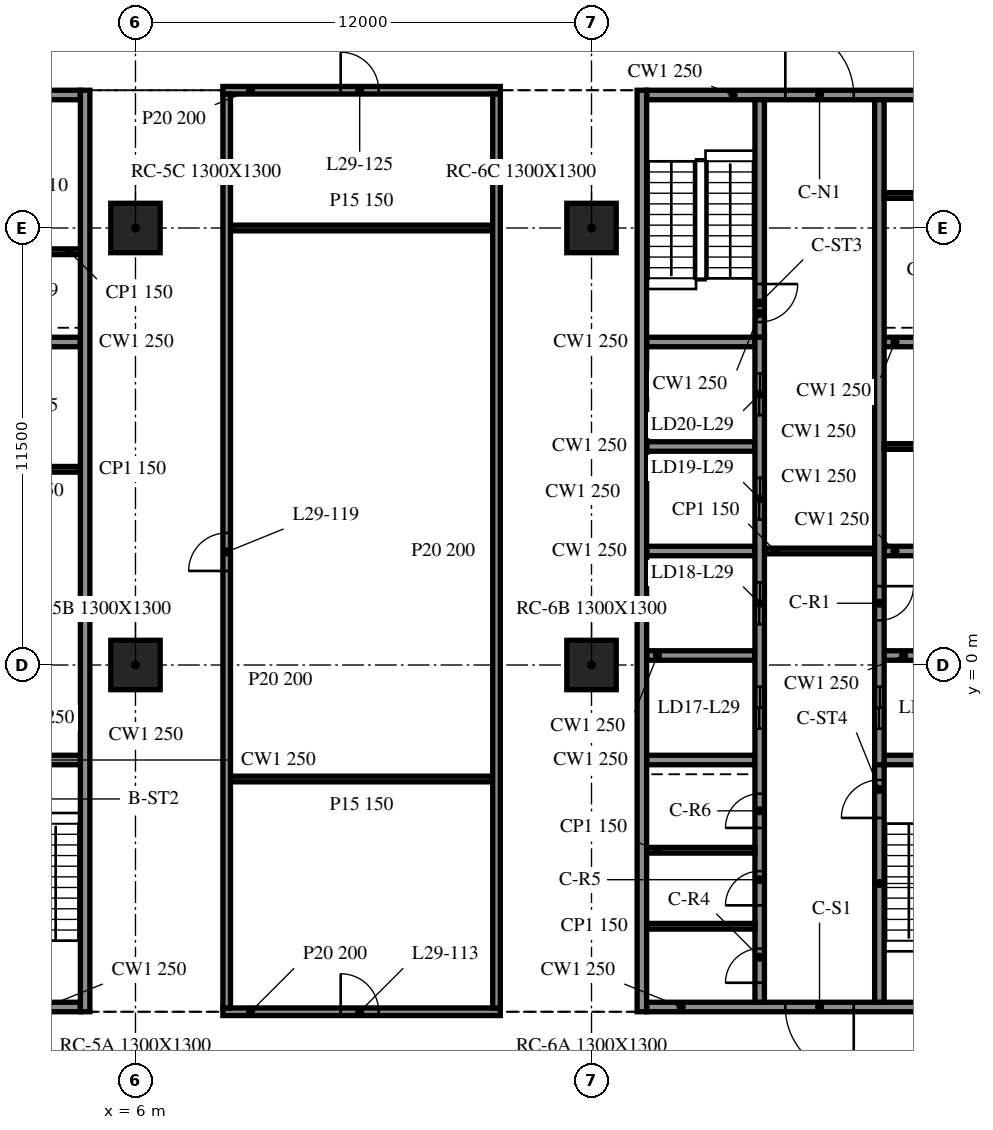
"""IFC4 building model, lengths in metres.
Left out: names, types, materials, properties, quantities, classifications, styles, units other than length and angle.
Written with IfcOpenShell. Run it as: python <this file> out.ifc"""

import sys

from ifc_helpers import new_model, si_unit, direction, frame, frame_2d, origin, origin_2d, place, context, subcontext, project, spatial, rectangle, extrude, element, fill, save


model = new_model("IFC4")
c1 = context("Model", 3, precision=1e-05, world=origin(), true_north=direction((0.0, 1.0)))
c2 = subcontext(c1, "Body", "Model", "MODEL_VIEW")
j1 = project(units=[si_unit("LENGTHUNIT", "METRE"), si_unit("PLANEANGLEUNIT", "RADIAN")], contexts=[c1])
p1 = place(None, origin())
s1 = spatial("IfcSite", under=j1, at=p1, CompositionType="ELEMENT")
p2 = place(p1, origin())
s2 = spatial("IfcBuilding", under=s1, at=p2, CompositionType="ELEMENT")
p3 = place(p2, frame((0.0, 0.0, 126.1)))
s3 = spatial("IfcBuildingStorey", under=s2, at=p3, CompositionType="ELEMENT", Elevation=126.1)
for number, where, z_axis, x_axis in (
    (1, (6.0, 0.0, -0.34), (0.0, 0.0, 1.0), (1.0, 0.0, 0.0)),
    (2, (6.0, 11.5, -0.34), (0.0, 0.0, 1.0), (1.0, 0.0, 0.0)),
    (3, (18.0, 0.0, -0.34), (0.0, 0.0, 1.0), (1.0, 0.0, 0.0)),
    (4, (18.0, 11.5, -0.34), (0.0, 0.0, 1.0), (1.0, 0.0, 0.0)),
):
    element("IfcColumn", number, at=place(p3, frame(where, z_axis=z_axis, x_axis=x_axis)), inside=s3, PredefinedType="COLUMN", context=c2, shape_type="SweptSolid", body=[
        extrude(rectangle(XDim=1.3, YDim=1.3, at=origin_2d()), origin(), (0.0, 0.0, 1.0), 4.1),
    ])
p4 = place(p3, frame((4.675, -9.125, 0.0), z_axis=(0.0, 0.0, 1.0), x_axis=(0.0, 1.0, 0.0)))
e5 = element("IfcWall", 5, at=p4, inside=s3, PredefinedType="SOLIDWALL", context=c2, shape_type="SweptSolid", body=[
    extrude(rectangle(XDim=24.25, YDim=0.25, at=frame_2d((12.125, 0.0))), origin(), (0.0, 0.0, 1.0), 3.76),
])
p5 = place(p3, frame((4.55, -9.0, 0.0), z_axis=(0.0, 0.0, 1.0), x_axis=(-1.0, 0.0, 0.0)))
e6 = element("IfcWall", 6, at=p5, inside=s3, PredefinedType="SOLIDWALL", context=c2, shape_type="SweptSolid", body=[
    extrude(rectangle(XDim=9.1, YDim=0.25, at=frame_2d((4.55, 0.0))), origin(), (0.0, 0.0, 1.0), 3.76),
])
p6 = place(p5, frame((3.65, 0.0, 0.0)))
e7 = element("IfcOpeningElement", 7, at=p6, cuts=e6, PredefinedType="OPENING", context=c2, shape_type="SweptSolid", body=[
    extrude(rectangle(XDim=1.8, YDim=2.1, at=frame_2d((0.9, 1.05))), frame((0.0, 0.135, 0.0), z_axis=(0.0, -1.0, 0.0), x_axis=(1.0, 0.0, 0.0)), (0.0, 0.0, 1.0), 0.27),
])
p7 = place(p3, frame((-4.55, 15.0, 0.0), z_axis=(0.0, 0.0, 1.0), x_axis=(1.0, 0.0, 0.0)))
e8 = element("IfcWall", 8, at=p7, inside=s3, PredefinedType="SOLIDWALL", context=c2, shape_type="SweptSolid", body=[
    extrude(rectangle(XDim=9.1, YDim=0.25, at=frame_2d((4.55, 0.0))), origin(), (0.0, 0.0, 1.0), 3.76),
])
p8 = place(p7, frame((3.65, 0.0, 0.0)))
e9 = element("IfcOpeningElement", 9, at=p8, cuts=e8, PredefinedType="OPENING", context=c2, shape_type="SweptSolid", body=[
    extrude(rectangle(XDim=1.8, YDim=2.1, at=frame_2d((0.9, 1.05))), frame((0.0, 0.135, 0.0), z_axis=(0.0, -1.0, 0.0), x_axis=(1.0, 0.0, 0.0)), (0.0, 0.0, 1.0), 0.27),
])
for number, where, z_axis, x_axis in (
    (10, (1.7, -2.5, 0.0), (0.0, 0.0, 1.0), (1.0, 0.0, 0.0)),
    (11, (1.7, 8.5, 0.0), (0.0, 0.0, 1.0), (1.0, 0.0, 0.0)),
):
    element("IfcWall", number, at=place(p3, frame(where, z_axis=z_axis, x_axis=x_axis)), inside=s3, PredefinedType="SOLIDWALL", context=c2, shape_type="SweptSolid", body=[
        extrude(rectangle(XDim=2.85, YDim=0.25, at=frame_2d((1.425, 0.0))), origin(), (0.0, 0.0, 1.0), 3.76),
    ])
for number, where, z_axis, x_axis in (
    (12, (1.7, 5.15, 0.0), (0.0, 0.0, 1.0), (1.0, 0.0, 0.0)),
    (13, (1.7, 10.875, 0.0), (0.0, 0.0, 1.0), (1.0, 0.0, 0.0)),
):
    element("IfcWall", number, at=place(p3, frame(where, z_axis=z_axis, x_axis=x_axis)), inside=s3, PredefinedType="PARTITIONING", context=c2, shape_type="SweptSolid", body=[
        extrude(rectangle(XDim=2.85, YDim=0.15, at=frame_2d((1.425, 0.0))), origin(), (0.0, 0.0, 1.0), 3.76),
    ])
p9 = place(p3, frame((19.325, 15.125, 0.0), z_axis=(0.0, 0.0, 1.0), x_axis=(0.0, -1.0, 0.0)))
e14 = element("IfcWall", 14, at=p9, inside=s3, PredefinedType="SOLIDWALL", context=c2, shape_type="SweptSolid", body=[
    extrude(rectangle(XDim=24.25, YDim=0.25, at=frame_2d((12.125, 0.0))), origin(), (0.0, 0.0, 1.0), 3.76),
])
p10 = place(p3, frame((28.55, -9.0, 0.0), z_axis=(0.0, 0.0, 1.0), x_axis=(-1.0, 0.0, 0.0)))
e15 = element("IfcWall", 15, at=p10, inside=s3, PredefinedType="SOLIDWALL", context=c2, shape_type="SweptSolid", body=[
    extrude(rectangle(XDim=9.1, YDim=0.25, at=frame_2d((4.55, 0.0))), origin(), (0.0, 0.0, 1.0), 3.76),
])
p11 = place(p10, frame((3.65, 0.0, 0.0)))
e16 = element("IfcOpeningElement", 16, at=p11, cuts=e15, PredefinedType="OPENING", context=c2, shape_type="SweptSolid", body=[
    extrude(rectangle(XDim=1.8, YDim=2.1, at=frame_2d((0.9, 1.05))), frame((0.0, 0.135, 0.0), z_axis=(0.0, -1.0, 0.0), x_axis=(1.0, 0.0, 0.0)), (0.0, 0.0, 1.0), 0.27),
])
p12 = place(p3, frame((19.45, 15.0, 0.0), z_axis=(0.0, 0.0, 1.0), x_axis=(1.0, 0.0, 0.0)))
e17 = element("IfcWall", 17, at=p12, inside=s3, PredefinedType="SOLIDWALL", context=c2, shape_type="SweptSolid", body=[
    extrude(rectangle(XDim=9.1, YDim=0.25, at=frame_2d((4.55, 0.0))), origin(), (0.0, 0.0, 1.0), 3.76),
])
p13 = place(p12, frame((3.65, 0.0, 0.0)))
e18 = element("IfcOpeningElement", 18, at=p13, cuts=e17, PredefinedType="OPENING", context=c2, shape_type="SweptSolid", body=[
    extrude(rectangle(XDim=1.8, YDim=2.1, at=frame_2d((0.9, 1.05))), frame((0.0, 0.135, 0.0), z_axis=(0.0, -1.0, 0.0), x_axis=(1.0, 0.0, 0.0)), (0.0, 0.0, 1.0), 0.27),
])
p14 = place(p3, frame((22.425, -8.875, 0.0), z_axis=(0.0, 0.0, 1.0), x_axis=(0.0, 1.0, 0.0)))
e19 = element("IfcWall", 19, at=p14, inside=s3, PredefinedType="SOLIDWALL", context=c2, shape_type="SweptSolid", body=[
    extrude(rectangle(XDim=17.5, YDim=0.25, at=frame_2d((8.75, 0.0))), origin(), (0.0, 0.0, 1.0), 3.76),
])
p15 = place(p14, frame((7.2, 0.0, 0.0)))
e20 = element("IfcOpeningElement", 20, at=p15, cuts=e19, PredefinedType="OPENING", context=c2, shape_type="SweptSolid", body=[
    extrude(rectangle(XDim=1.1, YDim=2.1, at=frame_2d((0.55, 1.05))), frame((0.0, 0.135, 0.0), z_axis=(0.0, -1.0, 0.0), x_axis=(1.0, 0.0, 0.0)), (0.0, 0.0, 1.0), 0.27),
])
p16 = place(p14, frame((9.95, 0.0, 0.0)))
e21 = element("IfcOpeningElement", 21, at=p16, cuts=e19, PredefinedType="OPENING", context=c2, shape_type="SweptSolid", body=[
    extrude(rectangle(XDim=1.1, YDim=2.1, at=frame_2d((0.55, 1.05))), frame((0.0, 0.135, 0.0), z_axis=(0.0, -1.0, 0.0), x_axis=(1.0, 0.0, 0.0)), (0.0, 0.0, 1.0), 0.27),
])
p17 = place(p14, frame((12.7, 0.0, 0.0)))
e22 = element("IfcOpeningElement", 22, at=p17, cuts=e19, PredefinedType="OPENING", context=c2, shape_type="SweptSolid", body=[
    extrude(rectangle(XDim=1.1, YDim=2.1, at=frame_2d((0.55, 1.05))), frame((0.0, 0.135, 0.0), z_axis=(0.0, -1.0, 0.0), x_axis=(1.0, 0.0, 0.0)), (0.0, 0.0, 1.0), 0.27),
])
p18 = place(p14, frame((15.45, 0.0, 0.0)))
e23 = element("IfcOpeningElement", 23, at=p18, cuts=e19, PredefinedType="OPENING", context=c2, shape_type="SweptSolid", body=[
    extrude(rectangle(XDim=1.1, YDim=2.1, at=frame_2d((0.55, 1.05))), frame((0.0, 0.135, 0.0), z_axis=(0.0, -1.0, 0.0), x_axis=(1.0, 0.0, 0.0)), (0.0, 0.0, 1.0), 0.27),
])
p19 = place(p14, frame((0.512, 0.0, 0.0)))
e24 = element("IfcOpeningElement", 24, at=p19, cuts=e19, PredefinedType="OPENING", context=c2, shape_type="SweptSolid", body=[
    extrude(rectangle(XDim=0.9, YDim=2.1, at=frame_2d((0.45, 1.05))), frame((0.0, 0.135, 0.0), z_axis=(0.0, -1.0, 0.0), x_axis=(1.0, 0.0, 0.0)), (0.0, 0.0, 1.0), 0.27),
])
p20 = place(p14, frame((2.55, 0.0, 0.0)))
e25 = element("IfcOpeningElement", 25, at=p20, cuts=e19, PredefinedType="OPENING", context=c2, shape_type="SweptSolid", body=[
    extrude(rectangle(XDim=0.9, YDim=2.1, at=frame_2d((0.45, 1.05))), frame((0.0, 0.135, 0.0), z_axis=(0.0, -1.0, 0.0), x_axis=(1.0, 0.0, 0.0)), (0.0, 0.0, 1.0), 0.27),
])
p21 = place(p14, frame((4.587, 0.0, 0.0)))
e26 = element("IfcOpeningElement", 26, at=p21, cuts=e19, PredefinedType="OPENING", context=c2, shape_type="SweptSolid", body=[
    extrude(rectangle(XDim=0.9, YDim=2.1, at=frame_2d((0.45, 1.05))), frame((0.0, 0.135, 0.0), z_axis=(0.0, -1.0, 0.0), x_axis=(1.0, 0.0, 0.0)), (0.0, 0.0, 1.0), 0.27),
])
p22 = place(p3, frame((22.425, 14.875, 0.0), z_axis=(0.0, 0.0, 1.0), x_axis=(0.0, -1.0, 0.0)))
e27 = element("IfcWall", 27, at=p22, inside=s3, PredefinedType="SOLIDWALL", context=c2, shape_type="SweptSolid", body=[
    extrude(rectangle(XDim=6.25, YDim=0.25, at=frame_2d((3.125, 0.0))), origin(), (0.0, 0.0, 1.0), 3.76),
])
p23 = place(p22, frame((4.85, 0.0, 0.0)))
e28 = element("IfcOpeningElement", 28, at=p23, cuts=e27, PredefinedType="OPENING", context=c2, shape_type="SweptSolid", body=[
    extrude(rectangle(XDim=1.0, YDim=2.1, at=frame_2d((0.5, 1.05))), frame((0.0, 0.135, 0.0), z_axis=(0.0, -1.0, 0.0), x_axis=(1.0, 0.0, 0.0)), (0.0, 0.0, 1.0), 0.27),
])
p24 = place(p3, frame((25.575, -8.875, 0.0), z_axis=(0.0, 0.0, 1.0), x_axis=(0.0, 1.0, 0.0)))
e29 = element("IfcWall", 29, at=p24, inside=s3, PredefinedType="SOLIDWALL", context=c2, shape_type="SweptSolid", body=[
    extrude(rectangle(XDim=6.25, YDim=0.25, at=frame_2d((3.125, 0.0))), origin(), (0.0, 0.0, 1.0), 3.76),
])
p25 = place(p24, frame((4.85, 0.0, 0.0)))
e30 = element("IfcOpeningElement", 30, at=p25, cuts=e29, PredefinedType="OPENING", context=c2, shape_type="SweptSolid", body=[
    extrude(rectangle(XDim=1.0, YDim=2.1, at=frame_2d((0.5, 1.05))), frame((0.0, 0.135, 0.0), z_axis=(0.0, -1.0, 0.0), x_axis=(1.0, 0.0, 0.0)), (0.0, 0.0, 1.0), 0.27),
])
p26 = place(p3, frame((25.575, 14.875, 0.0), z_axis=(0.0, 0.0, 1.0), x_axis=(0.0, -1.0, 0.0)))
e31 = element("IfcWall", 31, at=p26, inside=s3, PredefinedType="SOLIDWALL", context=c2, shape_type="SweptSolid", body=[
    extrude(rectangle(XDim=17.5, YDim=0.25, at=frame_2d((8.75, 0.0))), origin(), (0.0, 0.0, 1.0), 3.76),
])
p27 = place(p26, frame((15.45, 0.0, 0.0)))
e32 = element("IfcOpeningElement", 32, at=p27, cuts=e31, PredefinedType="OPENING", context=c2, shape_type="SweptSolid", body=[
    extrude(rectangle(XDim=1.1, YDim=2.1, at=frame_2d((0.55, 1.05))), frame((0.0, 0.135, 0.0), z_axis=(0.0, -1.0, 0.0), x_axis=(1.0, 0.0, 0.0)), (0.0, 0.0, 1.0), 0.27),
])
p28 = place(p26, frame((12.8, 0.0, 0.0)))
e33 = element("IfcOpeningElement", 33, at=p28, cuts=e31, PredefinedType="OPENING", context=c2, shape_type="SweptSolid", body=[
    extrude(rectangle(XDim=0.9, YDim=2.1, at=frame_2d((0.45, 1.05))), frame((0.0, 0.135, 0.0), z_axis=(0.0, -1.0, 0.0), x_axis=(1.0, 0.0, 0.0)), (0.0, 0.0, 1.0), 0.27),
])
for number, where, z_axis, x_axis in (
    (34, (19.45, -2.5, 0.0), (0.0, 0.0, 1.0), (1.0, 0.0, 0.0)),
    (35, (19.45, 0.25, 0.0), (0.0, 0.0, 1.0), (1.0, 0.0, 0.0)),
    (36, (19.45, 3.0, 0.0), (0.0, 0.0, 1.0), (1.0, 0.0, 0.0)),
    (37, (19.45, 5.75, 0.0), (0.0, 0.0, 1.0), (1.0, 0.0, 0.0)),
    (38, (19.45, 8.5, 0.0), (0.0, 0.0, 1.0), (1.0, 0.0, 0.0)),
    (39, (25.7, -2.5, 0.0), (0.0, 0.0, 1.0), (1.0, 0.0, 0.0)),
    (40, (25.7, 0.25, 0.0), (0.0, 0.0, 1.0), (1.0, 0.0, 0.0)),
    (41, (25.7, 3.0, 0.0), (0.0, 0.0, 1.0), (1.0, 0.0, 0.0)),
    (42, (25.7, 8.5, 0.0), (0.0, 0.0, 1.0), (1.0, 0.0, 0.0)),
):
    element("IfcWall", number, at=place(p3, frame(where, z_axis=z_axis, x_axis=x_axis)), inside=s3, PredefinedType="SOLIDWALL", context=c2, shape_type="SweptSolid", body=[
        extrude(rectangle(XDim=2.85, YDim=0.25, at=frame_2d((1.425, 0.0))), origin(), (0.0, 0.0, 1.0), 3.76),
    ])
p29 = place(p3, frame((22.55, 3.0, 0.0), z_axis=(0.0, 0.0, 1.0), x_axis=(1.0, 0.0, 0.0)))
e43 = element("IfcWall", 43, at=p29, inside=s3, PredefinedType="PARTITIONING", context=c2, shape_type="SweptSolid", body=[
    extrude(rectangle(XDim=2.9, YDim=0.15, at=frame_2d((1.45, 0.0))), origin(), (0.0, 0.0, 1.0), 3.76),
])
for number, where, z_axis, x_axis in (
    (44, (25.7, 5.75, 0.0), (0.0, 0.0, 1.0), (1.0, 0.0, 0.0)),
    (45, (19.45, -6.875, 0.0), (0.0, 0.0, 1.0), (1.0, 0.0, 0.0)),
    (46, (19.45, -4.875, 0.0), (0.0, 0.0, 1.0), (1.0, 0.0, 0.0)),
    (47, (25.7, 12.355, 0.0), (0.0, 0.0, 1.0), (1.0, 0.0, 0.0)),
):
    element("IfcWall", number, at=place(p3, frame(where, z_axis=z_axis, x_axis=x_axis)), inside=s3, PredefinedType="PARTITIONING", context=c2, shape_type="SweptSolid", body=[
        extrude(rectangle(XDim=2.85, YDim=0.15, at=frame_2d((1.425, 0.0))), origin(), (0.0, 0.0, 1.0), 3.76),
    ])
p30 = place(p3, frame((8.3, -9.125, 0.0), z_axis=(0.0, 0.0, 1.0), x_axis=(1.0, 0.0, 0.0)))
e48 = element("IfcWall", 48, at=p30, inside=s3, PredefinedType="PARTITIONING", context=c2, shape_type="SweptSolid", body=[
    extrude(rectangle(XDim=7.3, YDim=0.2, at=frame_2d((3.65, 0.0))), origin(), (0.0, 0.0, 1.0), 3.76),
])
p31 = place(p30, frame((3.1, 0.0, 0.0)))
e49 = element("IfcOpeningElement", 49, at=p31, cuts=e48, PredefinedType="OPENING", context=c2, shape_type="SweptSolid", body=[
    extrude(rectangle(XDim=1.0, YDim=2.1, at=frame_2d((0.5, 1.05))), frame((0.0, 0.11, 0.0), z_axis=(0.0, -1.0, 0.0), x_axis=(1.0, 0.0, 0.0)), (0.0, 0.0, 1.0), 0.22),
])
for number, where, z_axis, x_axis in (
    (50, (8.5, -3.0, 0.0), (0.0, 0.0, 1.0), (1.0, 0.0, 0.0)),
    (51, (8.5, 11.5, 0.0), (0.0, 0.0, 1.0), (1.0, 0.0, 0.0)),
):
    element("IfcWall", number, at=place(p3, frame(where, z_axis=z_axis, x_axis=x_axis)), inside=s3, PredefinedType="PARTITIONING", context=c2, shape_type="SweptSolid", body=[
        extrude(rectangle(XDim=6.9, YDim=0.15, at=frame_2d((3.45, 0.0))), origin(), (0.0, 0.0, 1.0), 3.76),
    ])
p32 = place(p3, frame((8.3, 15.125, 0.0), z_axis=(0.0, 0.0, 1.0), x_axis=(1.0, 0.0, 0.0)))
e52 = element("IfcWall", 52, at=p32, inside=s3, PredefinedType="PARTITIONING", context=c2, shape_type="SweptSolid", body=[
    extrude(rectangle(XDim=7.3, YDim=0.2, at=frame_2d((3.65, 0.0))), origin(), (0.0, 0.0, 1.0), 3.76),
])
p33 = place(p32, frame((3.1, 0.0, 0.0)))
e53 = element("IfcOpeningElement", 53, at=p33, cuts=e52, PredefinedType="OPENING", context=c2, shape_type="SweptSolid", body=[
    extrude(rectangle(XDim=1.0, YDim=2.1, at=frame_2d((0.5, 1.05))), frame((0.0, 0.11, 0.0), z_axis=(0.0, -1.0, 0.0), x_axis=(1.0, 0.0, 0.0)), (0.0, 0.0, 1.0), 0.22),
])
p34 = place(p3, frame((8.4, -9.025, 0.0), z_axis=(0.0, 0.0, 1.0), x_axis=(0.0, 1.0, 0.0)))
e54 = element("IfcWall", 54, at=p34, inside=s3, PredefinedType="PARTITIONING", context=c2, shape_type="SweptSolid", body=[
    extrude(rectangle(XDim=24.05, YDim=0.2, at=frame_2d((12.025, 0.0))), origin(), (0.0, 0.0, 1.0), 3.76),
])
p35 = place(p34, frame((11.5, 0.0, 0.0)))
e55 = element("IfcOpeningElement", 55, at=p35, cuts=e54, PredefinedType="OPENING", context=c2, shape_type="SweptSolid", body=[
    extrude(rectangle(XDim=1.0, YDim=2.1, at=frame_2d((0.5, 1.05))), frame((0.0, 0.11, 0.0), z_axis=(0.0, -1.0, 0.0), x_axis=(1.0, 0.0, 0.0)), (0.0, 0.0, 1.0), 0.22),
])
p36 = place(p3, frame((15.5, -9.025, 0.0), z_axis=(0.0, 0.0, 1.0), x_axis=(0.0, 1.0, 0.0)))
e56 = element("IfcWall", 56, at=p36, inside=s3, PredefinedType="PARTITIONING", context=c2, shape_type="SweptSolid", body=[
    extrude(rectangle(XDim=24.05, YDim=0.2, at=frame_2d((12.025, 0.0))), origin(), (0.0, 0.0, 1.0), 3.76),
])
p37 = place(p11, origin())
e57 = element("IfcDoor", 57, at=p37, inside=s3, OperationType="DOUBLE_DOOR_SINGLE_SWING", PredefinedType="DOOR", context=c2, shape_type="SweptSolid", body=[
    extrude(rectangle(XDim=1.8, YDim=2.1, at=frame_2d((0.9, 1.05))), frame((0.0, 0.025, 0.0), z_axis=(0.0, -1.0, 0.0), x_axis=(1.0, 0.0, 0.0)), (0.0, 0.0, 1.0), 0.05),
])
fill(e16, e57)
p38 = place(p13, origin())
e58 = element("IfcDoor", 58, at=p38, inside=s3, OperationType="DOUBLE_DOOR_SINGLE_SWING", PredefinedType="DOOR", context=c2, shape_type="SweptSolid", body=[
    extrude(rectangle(XDim=1.8, YDim=2.1, at=frame_2d((0.9, 1.05))), frame((0.0, 0.025, 0.0), z_axis=(0.0, -1.0, 0.0), x_axis=(1.0, 0.0, 0.0)), (0.0, 0.0, 1.0), 0.05),
])
fill(e18, e58)
p39 = place(p27, origin())
e59 = element("IfcDoor", 59, at=p39, inside=s3, OperationType="DOUBLE_DOOR_SLIDING", PredefinedType="DOOR", context=c2, shape_type="SweptSolid", body=[
    extrude(rectangle(XDim=1.1, YDim=2.1, at=frame_2d((0.55, 1.05))), frame((0.0, 0.025, 0.0), z_axis=(0.0, -1.0, 0.0), x_axis=(1.0, 0.0, 0.0)), (0.0, 0.0, 1.0), 0.05),
])
fill(e32, e59)
p40 = place(p15, origin())
e60 = element("IfcDoor", 60, at=p40, inside=s3, OperationType="DOUBLE_DOOR_SLIDING", PredefinedType="DOOR", context=c2, shape_type="SweptSolid", body=[
    extrude(rectangle(XDim=1.1, YDim=2.1, at=frame_2d((0.55, 1.05))), frame((0.0, 0.025, 0.0), z_axis=(0.0, -1.0, 0.0), x_axis=(1.0, 0.0, 0.0)), (0.0, 0.0, 1.0), 0.05),
])
fill(e20, e60)
p41 = place(p16, origin())
e61 = element("IfcDoor", 61, at=p41, inside=s3, OperationType="DOUBLE_DOOR_SLIDING", PredefinedType="DOOR", context=c2, shape_type="SweptSolid", body=[
    extrude(rectangle(XDim=1.1, YDim=2.1, at=frame_2d((0.55, 1.05))), frame((0.0, 0.025, 0.0), z_axis=(0.0, -1.0, 0.0), x_axis=(1.0, 0.0, 0.0)), (0.0, 0.0, 1.0), 0.05),
])
fill(e21, e61)
p42 = place(p17, origin())
e62 = element("IfcDoor", 62, at=p42, inside=s3, OperationType="DOUBLE_DOOR_SLIDING", PredefinedType="DOOR", context=c2, shape_type="SweptSolid", body=[
    extrude(rectangle(XDim=1.1, YDim=2.1, at=frame_2d((0.55, 1.05))), frame((0.0, 0.025, 0.0), z_axis=(0.0, -1.0, 0.0), x_axis=(1.0, 0.0, 0.0)), (0.0, 0.0, 1.0), 0.05),
])
fill(e22, e62)
p43 = place(p18, origin())
e63 = element("IfcDoor", 63, at=p43, inside=s3, OperationType="DOUBLE_DOOR_SLIDING", PredefinedType="DOOR", context=c2, shape_type="SweptSolid", body=[
    extrude(rectangle(XDim=1.1, YDim=2.1, at=frame_2d((0.55, 1.05))), frame((0.0, 0.025, 0.0), z_axis=(0.0, -1.0, 0.0), x_axis=(1.0, 0.0, 0.0)), (0.0, 0.0, 1.0), 0.05),
])
fill(e23, e63)
p44 = place(p28, origin())
e64 = element("IfcDoor", 64, at=p44, inside=s3, OperationType="SINGLE_SWING_LEFT", PredefinedType="DOOR", context=c2, shape_type="SweptSolid", body=[
    extrude(rectangle(XDim=0.9, YDim=2.1, at=frame_2d((0.45, 1.05))), frame((0.0, 0.025, 0.0), z_axis=(0.0, -1.0, 0.0), x_axis=(1.0, 0.0, 0.0)), (0.0, 0.0, 1.0), 0.05),
])
fill(e33, e64)
p45 = place(p19, origin())
e65 = element("IfcDoor", 65, at=p45, inside=s3, OperationType="SINGLE_SWING_RIGHT", PredefinedType="DOOR", context=c2, shape_type="SweptSolid", body=[
    extrude(rectangle(XDim=0.9, YDim=2.1, at=frame_2d((0.45, 1.05))), frame((0.0, 0.025, 0.0), z_axis=(0.0, -1.0, 0.0), x_axis=(1.0, 0.0, 0.0)), (0.0, 0.0, 1.0), 0.05),
])
fill(e24, e65)
p46 = place(p20, origin())
e66 = element("IfcDoor", 66, at=p46, inside=s3, OperationType="SINGLE_SWING_LEFT", PredefinedType="DOOR", context=c2, shape_type="SweptSolid", body=[
    extrude(rectangle(XDim=0.9, YDim=2.1, at=frame_2d((0.45, 1.05))), frame((0.0, 0.025, 0.0), z_axis=(0.0, -1.0, 0.0), x_axis=(1.0, 0.0, 0.0)), (0.0, 0.0, 1.0), 0.05),
])
fill(e25, e66)
p47 = place(p21, origin())
e67 = element("IfcDoor", 67, at=p47, inside=s3, OperationType="SINGLE_SWING_RIGHT", PredefinedType="DOOR", context=c2, shape_type="SweptSolid", body=[
    extrude(rectangle(XDim=0.9, YDim=2.1, at=frame_2d((0.45, 1.05))), frame((0.0, 0.025, 0.0), z_axis=(0.0, -1.0, 0.0), x_axis=(1.0, 0.0, 0.0)), (0.0, 0.0, 1.0), 0.05),
])
fill(e26, e67)
p48 = place(p23, origin())
e68 = element("IfcDoor", 68, at=p48, inside=s3, OperationType="SINGLE_SWING_LEFT", PredefinedType="DOOR", context=c2, shape_type="SweptSolid", body=[
    extrude(rectangle(XDim=1.0, YDim=2.1, at=frame_2d((0.5, 1.05))), frame((0.0, 0.025, 0.0), z_axis=(0.0, -1.0, 0.0), x_axis=(1.0, 0.0, 0.0)), (0.0, 0.0, 1.0), 0.05),
])
fill(e28, e68)
p49 = place(p25, origin())
e69 = element("IfcDoor", 69, at=p49, inside=s3, OperationType="SINGLE_SWING_RIGHT", PredefinedType="DOOR", context=c2, shape_type="SweptSolid", body=[
    extrude(rectangle(XDim=1.0, YDim=2.1, at=frame_2d((0.5, 1.05))), frame((0.0, 0.025, 0.0), z_axis=(0.0, -1.0, 0.0), x_axis=(1.0, 0.0, 0.0)), (0.0, 0.0, 1.0), 0.05),
])
fill(e30, e69)
p50 = place(p31, origin())
e70 = element("IfcDoor", 70, at=p50, inside=s3, OperationType="SINGLE_SWING_LEFT", PredefinedType="DOOR", context=c2, shape_type="SweptSolid", body=[
    extrude(rectangle(XDim=1.0, YDim=2.1, at=frame_2d((0.5, 1.05))), frame((0.0, 0.025, 0.0), z_axis=(0.0, -1.0, 0.0), x_axis=(1.0, 0.0, 0.0)), (0.0, 0.0, 1.0), 0.05),
])
fill(e49, e70)
p51 = place(p35, origin())
e71 = element("IfcDoor", 71, at=p51, inside=s3, OperationType="SINGLE_SWING_RIGHT", PredefinedType="DOOR", context=c2, shape_type="SweptSolid", body=[
    extrude(rectangle(XDim=1.0, YDim=2.1, at=frame_2d((0.5, 1.05))), frame((0.0, 0.025, 0.0), z_axis=(0.0, -1.0, 0.0), x_axis=(1.0, 0.0, 0.0)), (0.0, 0.0, 1.0), 0.05),
])
fill(e55, e71)
p52 = place(p33, origin())
e72 = element("IfcDoor", 72, at=p52, inside=s3, OperationType="SINGLE_SWING_RIGHT", PredefinedType="DOOR", context=c2, shape_type="SweptSolid", body=[
    extrude(rectangle(XDim=1.0, YDim=2.1, at=frame_2d((0.5, 1.05))), frame((0.0, 0.025, 0.0), z_axis=(0.0, -1.0, 0.0), x_axis=(1.0, 0.0, 0.0)), (0.0, 0.0, 1.0), 0.05),
])
fill(e53, e72)
save(model, sys.argv[1])
